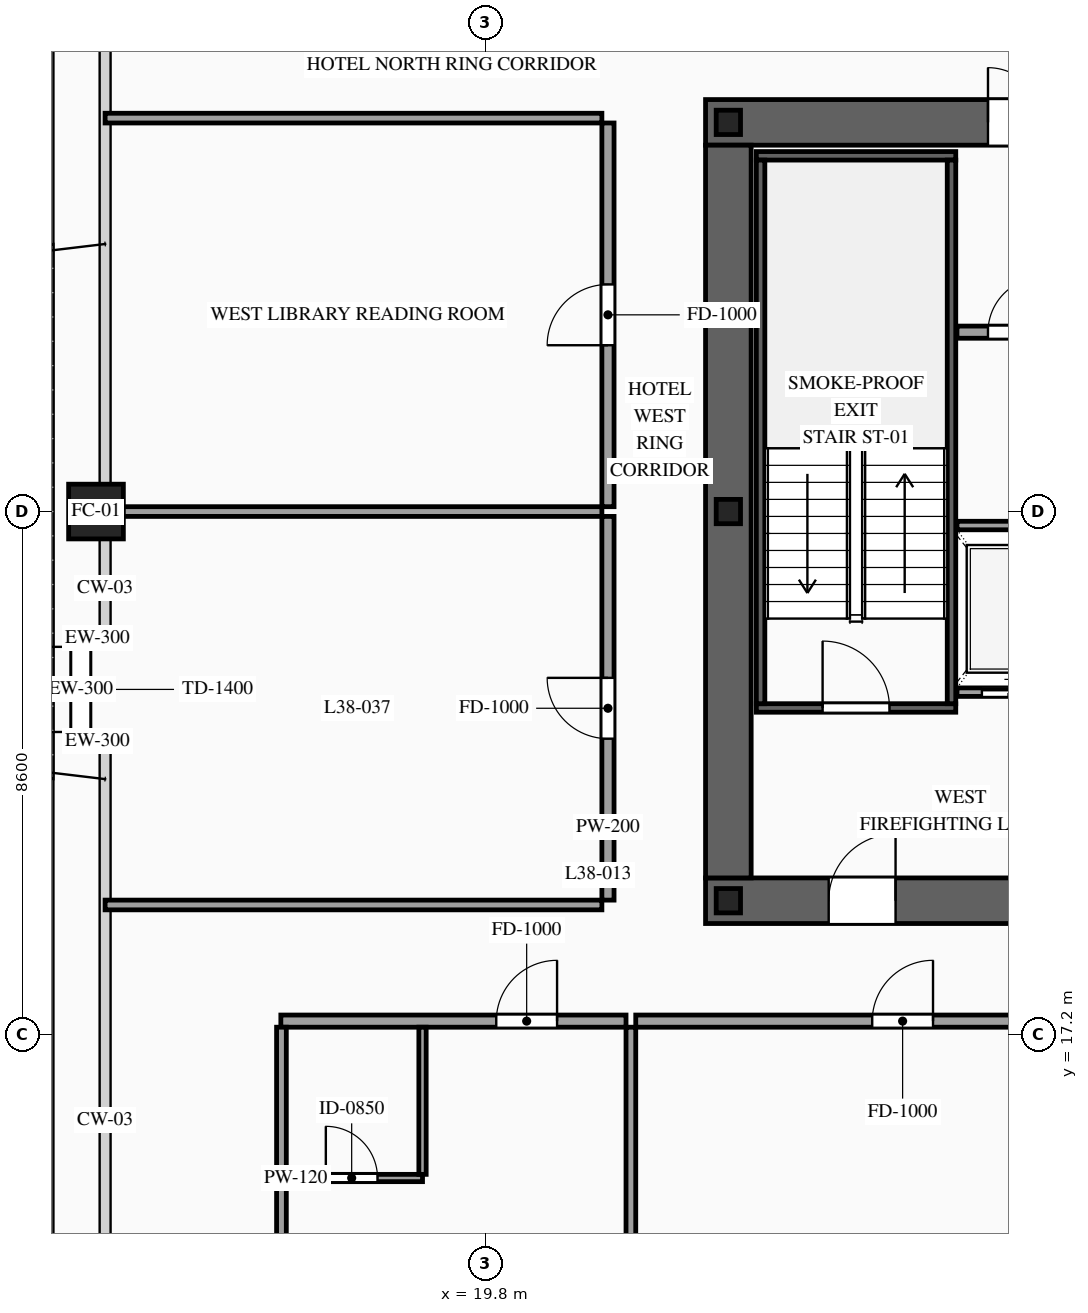
"""IFC4 building model, lengths in metres.
Left out: names, types, materials, properties, quantities, classifications, styles, units other than length and angle.
Written with IfcOpenShell. Run it as: python <this file> out.ifc"""

import sys

from ifc_helpers import new_model, si_unit, direction, frame, frame_2d, origin, origin_2d, place, context, subcontext, project, spatial, rectangle, hollow_rectangle, i_section, extrude, source, transform, mapped, element, fill, save


model = new_model("IFC4")
c1 = context("Model", 3, precision=1e-05, world=origin(), true_north=direction((0.0, 1.0)))
c2 = subcontext(c1, "Body", "Model", "MODEL_VIEW")
j1 = project(units=[si_unit("LENGTHUNIT", "METRE"), si_unit("PLANEANGLEUNIT", "RADIAN")], contexts=[c1])
p1 = place(None, origin())
s1 = spatial("IfcSite", under=j1, at=p1, CompositionType="ELEMENT")
p2 = place(p1, origin())
s2 = spatial("IfcBuilding", under=s1, at=p2, CompositionType="ELEMENT")
p3 = place(p2, frame((0.0, 0.0, 145.2)))
s3 = spatial("IfcBuildingStorey", under=s2, at=p3, CompositionType="ELEMENT", Elevation=145.2)
p4 = place(p3, frame((23.425, 19.4, 0.0), z_axis=(0.0, 0.0, 1.0), x_axis=(1.0, 0.0, 0.0)))
e1 = element("IfcWall", 1, at=p4, inside=s3, PredefinedType="SHEAR", context=c2, shape_type="SweptSolid", body=[
    extrude(rectangle(XDim=27.15, YDim=0.75, at=frame_2d((13.575, 0.0))), origin(), (0.0, 0.0, 1.0), 3.6),
])
p5 = place(p4, frame((2.025, 0.0, 0.0)))
e2 = element("IfcOpeningElement", 2, at=p5, cuts=e1, PredefinedType="OPENING", context=c2, shape_type="SweptSolid", body=[
    extrude(rectangle(XDim=1.1, YDim=2.2, at=frame_2d((0.55, 1.1))), frame((0.0, 0.39, 0.0), z_axis=(0.0, -1.0, 0.0), x_axis=(1.0, 0.0, 0.0)), (0.0, 0.0, 1.0), 0.78),
])
p6 = place(p4, frame((9.925, 0.0, 0.0)))
e3 = element("IfcOpeningElement", 3, at=p6, cuts=e1, PredefinedType="OPENING", context=c2, shape_type="SweptSolid", body=[
    extrude(rectangle(XDim=1.1, YDim=2.2, at=frame_2d((0.55, 1.1))), frame((0.0, 0.39, 0.0), z_axis=(0.0, -1.0, 0.0), x_axis=(1.0, 0.0, 0.0)), (0.0, 0.0, 1.0), 0.78),
])
p7 = place(p4, frame((23.125, 0.0, 0.0)))
e4 = element("IfcOpeningElement", 4, at=p7, cuts=e1, PredefinedType="OPENING", context=c2, shape_type="SweptSolid", body=[
    extrude(rectangle(XDim=1.1, YDim=2.2, at=frame_2d((0.55, 1.1))), frame((0.0, 0.39, 0.0), z_axis=(0.0, -1.0, 0.0), x_axis=(1.0, 0.0, 0.0)), (0.0, 0.0, 1.0), 0.78),
])
p8 = place(p4, frame((19.745, 0.0, 0.0)))
e5 = element("IfcOpeningElement", 5, at=p8, cuts=e1, PredefinedType="OPENING", context=c2, shape_type="SweptSolid", body=[
    extrude(rectangle(XDim=0.9, YDim=2.15, at=frame_2d((0.45, 1.075))), frame((0.0, 0.39, 0.0), z_axis=(0.0, -1.0, 0.0), x_axis=(1.0, 0.0, 0.0)), (0.0, 0.0, 1.0), 0.78),
])
p9 = place(p4, frame((18.305, 0.0, 0.0)))
e6 = element("IfcOpeningElement", 6, at=p9, cuts=e1, PredefinedType="OPENING", context=c2, shape_type="SweptSolid", body=[
    extrude(rectangle(XDim=0.9, YDim=2.15, at=frame_2d((0.45, 1.075))), frame((0.0, 0.39, 0.0), z_axis=(0.0, -1.0, 0.0), x_axis=(1.0, 0.0, 0.0)), (0.0, 0.0, 1.0), 0.78),
])
p10 = place(p3, frame((23.425, 32.2, 0.0), z_axis=(0.0, 0.0, 1.0), x_axis=(1.0, 0.0, 0.0)))
e7 = element("IfcWall", 7, at=p10, inside=s3, PredefinedType="SHEAR", context=c2, shape_type="SweptSolid", body=[
    extrude(rectangle(XDim=27.15, YDim=0.75, at=frame_2d((13.575, 0.0))), origin(), (0.0, 0.0, 1.0), 3.6),
])
p11 = place(p10, frame((4.645, 0.0, 0.0)))
e8 = element("IfcOpeningElement", 8, at=p11, cuts=e7, PredefinedType="OPENING", context=c2, shape_type="SweptSolid", body=[
    extrude(rectangle(XDim=0.9, YDim=2.15, at=frame_2d((0.45, 1.075))), frame((0.0, 0.39, 0.0), z_axis=(0.0, -1.0, 0.0), x_axis=(1.0, 0.0, 0.0)), (0.0, 0.0, 1.0), 0.78),
])
p12 = place(p10, frame((9.925, 0.0, 0.0)))
e9 = element("IfcOpeningElement", 9, at=p12, cuts=e7, PredefinedType="OPENING", context=c2, shape_type="SweptSolid", body=[
    extrude(rectangle(XDim=1.1, YDim=2.2, at=frame_2d((0.55, 1.1))), frame((0.0, 0.39, 0.0), z_axis=(0.0, -1.0, 0.0), x_axis=(1.0, 0.0, 0.0)), (0.0, 0.0, 1.0), 0.78),
])
p13 = place(p10, frame((15.775, 0.0, 0.0)))
e10 = element("IfcOpeningElement", 10, at=p13, cuts=e7, PredefinedType="OPENING", context=c2, shape_type="SweptSolid", body=[
    extrude(rectangle(XDim=1.1, YDim=2.2, at=frame_2d((0.55, 1.1))), frame((0.0, 0.39, 0.0), z_axis=(0.0, -1.0, 0.0), x_axis=(1.0, 0.0, 0.0)), (0.0, 0.0, 1.0), 0.78),
])
p14 = place(p10, frame((19.745, 0.0, 0.0)))
e11 = element("IfcOpeningElement", 11, at=p14, cuts=e7, PredefinedType="OPENING", context=c2, shape_type="SweptSolid", body=[
    extrude(rectangle(XDim=0.9, YDim=2.15, at=frame_2d((0.45, 1.075))), frame((0.0, 0.39, 0.0), z_axis=(0.0, -1.0, 0.0), x_axis=(1.0, 0.0, 0.0)), (0.0, 0.0, 1.0), 0.78),
])
m1 = source(origin(), c2, "Body", "SweptSolid", [
    extrude(rectangle(XDim=12.05, YDim=0.75, at=frame_2d((6.025, 0.0))), origin(), (0.0, 0.0, 1.0), 3.6),
])
p15 = place(p3, frame((23.8, 19.775, 0.0), z_axis=(0.0, 0.0, 1.0), x_axis=(0.0, 1.0, 0.0)))
e12 = element("IfcWall", 12, at=p15, inside=s3, PredefinedType="SHEAR", context=c2, shape_type="MappedRepresentation", body=[
    mapped(m1, transform((0.0, 0.0, 0.0), scale=1.0)),
])
m2 = source(origin(), c2, "Body", "SweptSolid", [
    extrude(i_section(OverallWidth=0.4, OverallDepth=0.4, WebThickness=0.013, FlangeThickness=0.021, at=origin_2d()), origin(), (0.0, 0.0, 1.0), 3.6),
])
for number, where, z_axis, x_axis in (
    (13, (23.8, 19.4, 0.0), (0.0, 0.0, 1.0), (1.0, 0.0, 0.0)),
    (14, (23.8, 25.8, 0.0), (0.0, 0.0, 1.0), (1.0, 0.0, 0.0)),
    (15, (23.8, 32.2, 0.0), (0.0, 0.0, 1.0), (1.0, 0.0, 0.0)),
):
    element("IfcColumn", number, at=place(p3, frame(where, z_axis=z_axis, x_axis=x_axis)), inside=s3, PredefinedType="COLUMN", context=c2, shape_type="MappedRepresentation", body=[
        mapped(m2, transform((0.0, 0.0, 0.0), scale=1.0)),
    ])
m3 = source(origin(), c2, "Body", "SweptSolid", [
    extrude(hollow_rectangle(XDim=0.9, YDim=0.9, WallThickness=0.042, at=origin_2d()), origin(), (0.0, 0.0, 1.0), 3.6),
])
p16 = place(p3, frame((13.4, 25.8, 0.0), z_axis=(0.0, 0.0, 1.0), x_axis=(1.0, 0.0, 0.0)))
e16 = element("IfcColumn", 16, at=p16, inside=s3, PredefinedType="COLUMN", context=c2, shape_type="MappedRepresentation", body=[
    mapped(m3, transform((0.0, 0.0, 0.0), scale=1.0)),
])
p17 = place(p3, frame((13.15, 21.875, 0.0), z_axis=(0.0, 0.0, 1.0), x_axis=(0.0, 1.0, 0.0)))
e17 = element("IfcWall", 17, at=p17, inside=s3, PredefinedType="SOLIDWALL", context=c2, shape_type="SweptSolid", body=[
    extrude(rectangle(XDim=2.0, YDim=0.3, at=frame_2d((1.0, 0.0))), origin(), (0.0, 0.0, 1.0), 3.38),
])
p18 = place(p17, frame((0.3, 0.0, 0.0)))
e18 = element("IfcOpeningElement", 18, at=p18, cuts=e17, PredefinedType="OPENING", context=c2, shape_type="SweptSolid", body=[
    extrude(rectangle(XDim=1.4, YDim=2.3, at=frame_2d((0.7, 1.15))), frame((0.0, 0.165, 0.0), z_axis=(0.0, -1.0, 0.0), x_axis=(1.0, 0.0, 0.0)), (0.0, 0.0, 1.0), 0.33),
])
m4 = source(origin(), c2, "Body", "SweptSolid", [
    extrude(rectangle(XDim=0.25, YDim=0.3, at=frame_2d((0.125, 0.0))), origin(), (0.0, 0.0, 1.0), 3.38),
])
for number, where, z_axis, x_axis in (
    (19, (13.55, 22.025, 0.0), (0.0, 0.0, 1.0), (-1.0, 0.0, 0.0)),
    (20, (13.3, 23.725, 0.0), (0.0, 0.0, 1.0), (1.0, 0.0, 0.0)),
):
    element("IfcWall", number, at=place(p3, frame(where, z_axis=z_axis, x_axis=x_axis)), inside=s3, PredefinedType="SOLIDWALL", context=c2, shape_type="MappedRepresentation", body=[
        mapped(m4, transform((0.0, 0.0, 0.0), scale=1.0)),
    ])
p19 = place(p3, frame((27.56, 22.83, 0.0), z_axis=(0.0, 0.0, 1.0), x_axis=(1.0, 0.0, 0.0)))
e21 = element("IfcWall", 21, at=p19, inside=s3, PredefinedType="SOLIDWALL", context=c2, shape_type="SweptSolid", body=[
    extrude(rectangle(XDim=1.92, YDim=0.14, at=frame_2d((0.96, 0.0))), origin(), (0.0, 0.0, 1.0), 3.38),
])
p20 = place(p19, frame((0.41, 0.0, 0.0)))
e22 = element("IfcOpeningElement", 22, at=p20, cuts=e21, PredefinedType="OPENING", context=c2, shape_type="SweptSolid", body=[
    extrude(rectangle(XDim=1.1, YDim=2.2, at=frame_2d((0.55, 1.1))), frame((0.0, 0.085, 0.0), z_axis=(0.0, -1.0, 0.0), x_axis=(1.0, 0.0, 0.0)), (0.0, 0.0, 1.0), 0.17),
])
m5 = source(origin(), c2, "Body", "SweptSolid", [
    extrude(rectangle(XDim=1.92, YDim=0.14, at=frame_2d((0.96, 0.0))), origin(), (0.0, 0.0, 1.0), 3.38),
])
p21 = place(p3, frame((27.56, 25.57, 0.0), z_axis=(0.0, 0.0, 1.0), x_axis=(1.0, 0.0, 0.0)))
e23 = element("IfcWall", 23, at=p21, inside=s3, PredefinedType="SOLIDWALL", context=c2, shape_type="MappedRepresentation", body=[
    mapped(m5, transform((0.0, 0.0, 0.0), scale=1.0)),
])
p22 = place(p3, frame((24.26, 22.57, 0.0), z_axis=(0.0, 0.0, 1.0), x_axis=(1.0, 0.0, 0.0)))
e24 = element("IfcWall", 24, at=p22, inside=s3, PredefinedType="SOLIDWALL", context=c2, shape_type="SweptSolid", body=[
    extrude(rectangle(XDim=3.28, YDim=0.14, at=frame_2d((1.64, 0.0))), origin(), (0.0, 0.0, 1.0), 3.38),
])
p23 = place(p22, frame((1.09, 0.0, 0.0)))
e25 = element("IfcOpeningElement", 25, at=p23, cuts=e24, PredefinedType="OPENING", context=c2, shape_type="SweptSolid", body=[
    extrude(rectangle(XDim=1.1, YDim=2.2, at=frame_2d((0.55, 1.1))), frame((0.0, 0.085, 0.0), z_axis=(0.0, -1.0, 0.0), x_axis=(1.0, 0.0, 0.0)), (0.0, 0.0, 1.0), 0.17),
])
m6 = source(origin(), c2, "Body", "SweptSolid", [
    extrude(rectangle(XDim=3.28, YDim=0.14, at=frame_2d((1.64, 0.0))), origin(), (0.0, 0.0, 1.0), 3.38),
])
p24 = place(p3, frame((24.26, 31.65, 0.0), z_axis=(0.0, 0.0, 1.0), x_axis=(1.0, 0.0, 0.0)))
e26 = element("IfcWall", 26, at=p24, inside=s3, PredefinedType="SOLIDWALL", context=c2, shape_type="MappedRepresentation", body=[
    mapped(m6, transform((0.0, 0.0, 0.0), scale=1.0)),
])
m7 = source(origin(), c2, "Body", "SweptSolid", [
    extrude(rectangle(XDim=8.94, YDim=0.14, at=frame_2d((4.47, 0.0))), origin(), (0.0, 0.0, 1.0), 3.38),
])
for number, where, z_axis, x_axis in (
    (27, (24.33, 22.64, 0.0), (0.0, 0.0, 1.0), (0.0, 1.0, 0.0)),
    (28, (27.47, 22.64, 0.0), (0.0, 0.0, 1.0), (0.0, 1.0, 0.0)),
):
    element("IfcWall", number, at=place(p3, frame(where, z_axis=z_axis, x_axis=x_axis)), inside=s3, PredefinedType="SOLIDWALL", context=c2, shape_type="MappedRepresentation", body=[
        mapped(m7, transform((0.0, 0.0, 0.0), scale=1.0)),
    ])
p25 = place(p3, frame((27.56, 28.75, 0.0), z_axis=(0.0, 0.0, 1.0), x_axis=(1.0, 0.0, 0.0)))
e29 = element("IfcWall", 29, at=p25, inside=s3, PredefinedType="PARTITIONING", context=c2, shape_type="SweptSolid", body=[
    extrude(rectangle(XDim=1.92, YDim=0.2, at=frame_2d((0.96, 0.0))), origin(), (0.0, 0.0, 1.0), 3.38),
])
p26 = place(p25, frame((0.51, 0.0, 0.0)))
e30 = element("IfcOpeningElement", 30, at=p26, cuts=e29, PredefinedType="OPENING", context=c2, shape_type="SweptSolid", body=[
    extrude(rectangle(XDim=0.9, YDim=2.15, at=frame_2d((0.45, 1.075))), frame((0.0, 0.115, 0.0), z_axis=(0.0, -1.0, 0.0), x_axis=(1.0, 0.0, 0.0)), (0.0, 0.0, 1.0), 0.23),
])
p27 = place(p3, frame((16.44, 17.42, 0.0), z_axis=(0.0, 0.0, 1.0), x_axis=(1.0, 0.0, 0.0)))
e31 = element("IfcWall", 31, at=p27, inside=s3, PredefinedType="PARTITIONING", context=c2, shape_type="SweptSolid", body=[
    extrude(rectangle(XDim=5.677, YDim=0.2, at=frame_2d((2.838, 0.0))), origin(), (0.0, 0.0, 1.0), 3.38),
])
p28 = place(p27, frame((3.543, 0.0, 0.0)))
e32 = element("IfcOpeningElement", 32, at=p28, cuts=e31, PredefinedType="OPENING", context=c2, shape_type="SweptSolid", body=[
    extrude(rectangle(XDim=1.0, YDim=2.2, at=frame_2d((0.5, 1.1))), frame((0.0, 0.115, 0.0), z_axis=(0.0, -1.0, 0.0), x_axis=(1.0, 0.0, 0.0)), (0.0, 0.0, 1.0), 0.23),
])
m8 = source(origin(), c2, "Body", "SweptSolid", [
    extrude(rectangle(XDim=14.97, YDim=0.16, at=frame_2d((7.485, 0.0))), origin(), (0.0, 0.0, 1.0), 3.38),
])
p29 = place(p3, frame((22.197, 2.35, 0.0), z_axis=(0.0, 0.0, 1.0), x_axis=(0.0, 1.0, 0.0)))
e33 = element("IfcWall", 33, at=p29, inside=s3, PredefinedType="PARTITIONING", context=c2, shape_type="MappedRepresentation", body=[
    mapped(m8, transform((0.0, 0.0, 0.0), scale=1.0)),
])
p30 = place(p3, frame((16.44, 14.84, 0.0), z_axis=(0.0, 0.0, 1.0), x_axis=(1.0, 0.0, 0.0)))
e34 = element("IfcWall", 34, at=p30, inside=s3, PredefinedType="PARTITIONING", context=c2, shape_type="SweptSolid", body=[
    extrude(rectangle(XDim=2.33, YDim=0.12, at=frame_2d((1.165, 0.0))), origin(), (0.0, 0.0, 1.0), 3.38),
])
p31 = place(p30, frame((0.74, 0.0, 0.0)))
e35 = element("IfcOpeningElement", 35, at=p31, cuts=e34, PredefinedType="OPENING", context=c2, shape_type="SweptSolid", body=[
    extrude(rectangle(XDim=0.85, YDim=2.1, at=frame_2d((0.425, 1.05))), frame((0.0, 0.075, 0.0), z_axis=(0.0, -1.0, 0.0), x_axis=(1.0, 0.0, 0.0)), (0.0, 0.0, 1.0), 0.15),
])
m9 = source(origin(), c2, "Body", "SweptSolid", [
    extrude(rectangle(XDim=2.42, YDim=0.12, at=frame_2d((1.21, 0.0))), origin(), (0.0, 0.0, 1.0), 3.38),
])
p32 = place(p3, frame((18.77, 14.9, 0.0), z_axis=(0.0, 0.0, 1.0), x_axis=(0.0, 1.0, 0.0)))
e36 = element("IfcWall", 36, at=p32, inside=s3, PredefinedType="PARTITIONING", context=c2, shape_type="MappedRepresentation", body=[
    mapped(m9, transform((0.0, 0.0, 0.0), scale=1.0)),
])
p33 = place(p3, frame((22.277, 17.42, 0.0), z_axis=(0.0, 0.0, 1.0), x_axis=(1.0, 0.0, 0.0)))
e37 = element("IfcWall", 37, at=p33, inside=s3, PredefinedType="PARTITIONING", context=c2, shape_type="SweptSolid", body=[
    extrude(rectangle(XDim=8.777, YDim=0.2, at=frame_2d((4.388, 0.0))), origin(), (0.0, 0.0, 1.0), 3.38),
])
p34 = place(p33, frame((3.889, 0.0, 0.0)))
e38 = element("IfcOpeningElement", 38, at=p34, cuts=e37, PredefinedType="OPENING", context=c2, shape_type="SweptSolid", body=[
    extrude(rectangle(XDim=1.0, YDim=2.2, at=frame_2d((0.5, 1.1))), frame((0.0, 0.115, 0.0), z_axis=(0.0, -1.0, 0.0), x_axis=(1.0, 0.0, 0.0)), (0.0, 0.0, 1.0), 0.23),
])
m10 = source(origin(), c2, "Body", "SweptSolid", [
    extrude(rectangle(XDim=14.82, YDim=0.16, at=frame_2d((7.41, 0.0))), origin(), (0.0, 0.0, 1.0), 3.38),
])
p35 = place(p3, frame((16.45, 2.5, 0.0), z_axis=(0.0, 0.0, 1.0), x_axis=(0.0, 1.0, 0.0)))
e39 = element("IfcWall", 39, at=p35, inside=s3, PredefinedType="PARTITIONING", context=c2, shape_type="MappedRepresentation", body=[
    mapped(m10, transform((0.0, 0.0, 0.0), scale=1.0)),
])
p36 = place(p3, frame((21.82, 19.41, 0.0), z_axis=(0.0, 0.0, 1.0), x_axis=(0.0, 1.0, 0.0)))
e40 = element("IfcWall", 40, at=p36, inside=s3, PredefinedType="PARTITIONING", context=c2, shape_type="SweptSolid", body=[
    extrude(rectangle(XDim=6.31, YDim=0.2, at=frame_2d((3.155, 0.0))), origin(), (0.0, 0.0, 1.0), 3.38),
])
p37 = place(p36, frame((2.655, 0.0, 0.0)))
e41 = element("IfcOpeningElement", 41, at=p37, cuts=e40, PredefinedType="OPENING", context=c2, shape_type="SweptSolid", body=[
    extrude(rectangle(XDim=1.0, YDim=2.2, at=frame_2d((0.5, 1.1))), frame((0.0, 0.115, 0.0), z_axis=(0.0, -1.0, 0.0), x_axis=(1.0, 0.0, 0.0)), (0.0, 0.0, 1.0), 0.23),
])
m11 = source(origin(), c2, "Body", "SweptSolid", [
    extrude(rectangle(XDim=8.17, YDim=0.16, at=frame_2d((4.085, 0.0))), origin(), (0.0, 0.0, 1.0), 2.675),
])
p38 = place(p3, frame((13.55, 25.8, 0.0), z_axis=(0.0, 0.0, 1.0), x_axis=(1.0, 0.0, 0.0)))
e42 = element("IfcWall", 42, at=p38, inside=s3, PredefinedType="PARTITIONING", context=c2, shape_type="MappedRepresentation", body=[
    mapped(m11, transform((0.0, 0.0, 0.0), scale=1.0)),
])
m12 = source(origin(), c2, "Body", "SweptSolid", [
    extrude(rectangle(XDim=8.17, YDim=0.16, at=frame_2d((4.085, 0.0))), origin(), (0.0, 0.0, 1.0), 2.875),
])
p39 = place(p3, frame((13.55, 19.33, 0.0), z_axis=(0.0, 0.0, 1.0), x_axis=(1.0, 0.0, 0.0)))
e43 = element("IfcWall", 43, at=p39, inside=s3, PredefinedType="PARTITIONING", context=c2, shape_type="MappedRepresentation", body=[
    mapped(m12, transform((0.0, 0.0, 0.0), scale=1.0)),
])
p40 = place(p3, frame((21.82, 25.88, 0.0), z_axis=(0.0, 0.0, 1.0), x_axis=(0.0, 1.0, 0.0)))
e44 = element("IfcWall", 44, at=p40, inside=s3, PredefinedType="PARTITIONING", context=c2, shape_type="SweptSolid", body=[
    extrude(rectangle(XDim=6.31, YDim=0.2, at=frame_2d((3.155, 0.0))), origin(), (0.0, 0.0, 1.0), 3.38),
])
p41 = place(p40, frame((2.655, 0.0, 0.0)))
e45 = element("IfcOpeningElement", 45, at=p41, cuts=e44, PredefinedType="OPENING", context=c2, shape_type="SweptSolid", body=[
    extrude(rectangle(XDim=1.0, YDim=2.2, at=frame_2d((0.5, 1.1))), frame((0.0, 0.115, 0.0), z_axis=(0.0, -1.0, 0.0), x_axis=(1.0, 0.0, 0.0)), (0.0, 0.0, 1.0), 0.23),
])
p42 = place(p3, frame((13.55, 32.27, 0.0), z_axis=(0.0, 0.0, 1.0), x_axis=(1.0, 0.0, 0.0)))
e46 = element("IfcWall", 46, at=p42, inside=s3, PredefinedType="PARTITIONING", context=c2, shape_type="MappedRepresentation", body=[
    mapped(m12, transform((0.0, 0.0, 0.0), scale=1.0)),
])
m13 = source(origin(), c2, "Body", "SweptSolid", [
    extrude(rectangle(XDim=1.4, YDim=2.3, at=frame_2d((0.7, 1.15))), frame((0.0, 0.025, 0.0), z_axis=(0.0, -1.0, 0.0), x_axis=(1.0, 0.0, 0.0)), (0.0, 0.0, 1.0), 0.05),
])
p43 = place(p18, origin())
e47 = element("IfcDoor", 47, at=p43, inside=s3, OperationType="DOUBLE_DOOR_SINGLE_SWING", PredefinedType="DOOR", context=c2, shape_type="MappedRepresentation", body=[
    mapped(m13, transform((0.0, 0.0, 0.0), scale=1.0)),
])
fill(e18, e47)
m14 = source(origin(), c2, "Body", "SweptSolid", [
    extrude(rectangle(XDim=1.1, YDim=2.2, at=frame_2d((0.55, 1.1))), frame((0.0, 0.025, 0.0), z_axis=(0.0, -1.0, 0.0), x_axis=(1.0, 0.0, 0.0)), (0.0, 0.0, 1.0), 0.05),
])
p44 = place(p20, origin())
e48 = element("IfcDoor", 48, at=p44, inside=s3, OperationType="SLIDING_TO_LEFT", PredefinedType="DOOR", context=c2, shape_type="MappedRepresentation", body=[
    mapped(m14, transform((0.0, 0.0, 0.0), scale=1.0)),
])
fill(e22, e48)
m15 = source(origin(), c2, "Body", "SweptSolid", [
    extrude(rectangle(XDim=1.1, YDim=2.2, at=frame_2d((0.55, 1.1))), frame((0.0, 0.025, 0.0), z_axis=(0.0, -1.0, 0.0), x_axis=(1.0, 0.0, 0.0)), (0.0, 0.0, 1.0), 0.05),
])
p45 = place(p23, origin())
e49 = element("IfcDoor", 49, at=p45, inside=s3, OperationType="SINGLE_SWING_LEFT", PredefinedType="DOOR", context=c2, shape_type="MappedRepresentation", body=[
    mapped(m15, transform((0.0, 0.0, 0.0), scale=1.0)),
])
fill(e25, e49)
p46 = place(p5, origin())
e50 = element("IfcDoor", 50, at=p46, inside=s3, OperationType="SINGLE_SWING_RIGHT", PredefinedType="DOOR", context=c2, shape_type="MappedRepresentation", body=[
    mapped(m15, transform((0.0, 0.0, 0.0), scale=1.0)),
])
fill(e2, e50)
m16 = source(origin(), c2, "Body", "SweptSolid", [
    extrude(rectangle(XDim=0.9, YDim=2.15, at=frame_2d((0.45, 1.075))), frame((0.0, 0.025, 0.0), z_axis=(0.0, -1.0, 0.0), x_axis=(1.0, 0.0, 0.0)), (0.0, 0.0, 1.0), 0.05),
])
p47 = place(p11, origin())
e51 = element("IfcDoor", 51, at=p47, inside=s3, OperationType="SINGLE_SWING_LEFT", PredefinedType="DOOR", context=c2, shape_type="MappedRepresentation", body=[
    mapped(m16, transform((0.0, 0.0, 0.0), scale=1.0)),
])
fill(e8, e51)
p48 = place(p26, origin())
e52 = element("IfcDoor", 52, at=p48, inside=s3, OperationType="SINGLE_SWING_RIGHT", PredefinedType="DOOR", context=c2, shape_type="MappedRepresentation", body=[
    mapped(m16, transform((0.0, 0.0, 0.0), scale=1.0)),
])
fill(e30, e52)
m17 = source(origin(), c2, "Body", "SweptSolid", [
    extrude(rectangle(XDim=1.0, YDim=2.2, at=frame_2d((0.5, 1.1))), frame((0.0, 0.025, 0.0), z_axis=(0.0, -1.0, 0.0), x_axis=(1.0, 0.0, 0.0)), (0.0, 0.0, 1.0), 0.05),
])
p49 = place(p28, origin())
e53 = element("IfcDoor", 53, at=p49, inside=s3, OperationType="SINGLE_SWING_RIGHT", PredefinedType="DOOR", context=c2, shape_type="MappedRepresentation", body=[
    mapped(m17, transform((0.0, 0.0, 0.0), scale=1.0)),
])
fill(e32, e53)
m18 = source(origin(), c2, "Body", "SweptSolid", [
    extrude(rectangle(XDim=0.85, YDim=2.1, at=frame_2d((0.425, 1.05))), frame((0.0, 0.025, 0.0), z_axis=(0.0, -1.0, 0.0), x_axis=(1.0, 0.0, 0.0)), (0.0, 0.0, 1.0), 0.05),
])
p50 = place(p31, origin())
e54 = element("IfcDoor", 54, at=p50, inside=s3, OperationType="SINGLE_SWING_LEFT", PredefinedType="DOOR", context=c2, shape_type="MappedRepresentation", body=[
    mapped(m18, transform((0.0, 0.0, 0.0), scale=1.0)),
])
fill(e35, e54)
p51 = place(p34, origin())
e55 = element("IfcDoor", 55, at=p51, inside=s3, OperationType="SINGLE_SWING_RIGHT", PredefinedType="DOOR", context=c2, shape_type="MappedRepresentation", body=[
    mapped(m17, transform((0.0, 0.0, 0.0), scale=1.0)),
])
fill(e38, e55)
p52 = place(p37, origin())
e56 = element("IfcDoor", 56, at=p52, inside=s3, OperationType="SINGLE_SWING_RIGHT", PredefinedType="DOOR", context=c2, shape_type="MappedRepresentation", body=[
    mapped(m17, transform((0.0, 0.0, 0.0), scale=1.0)),
])
fill(e41, e56)
p53 = place(p41, origin())
e57 = element("IfcDoor", 57, at=p53, inside=s3, OperationType="SINGLE_SWING_LEFT", PredefinedType="DOOR", context=c2, shape_type="MappedRepresentation", body=[
    mapped(m17, transform((0.0, 0.0, 0.0), scale=1.0)),
])
fill(e45, e57)
save(model, sys.argv[1])
